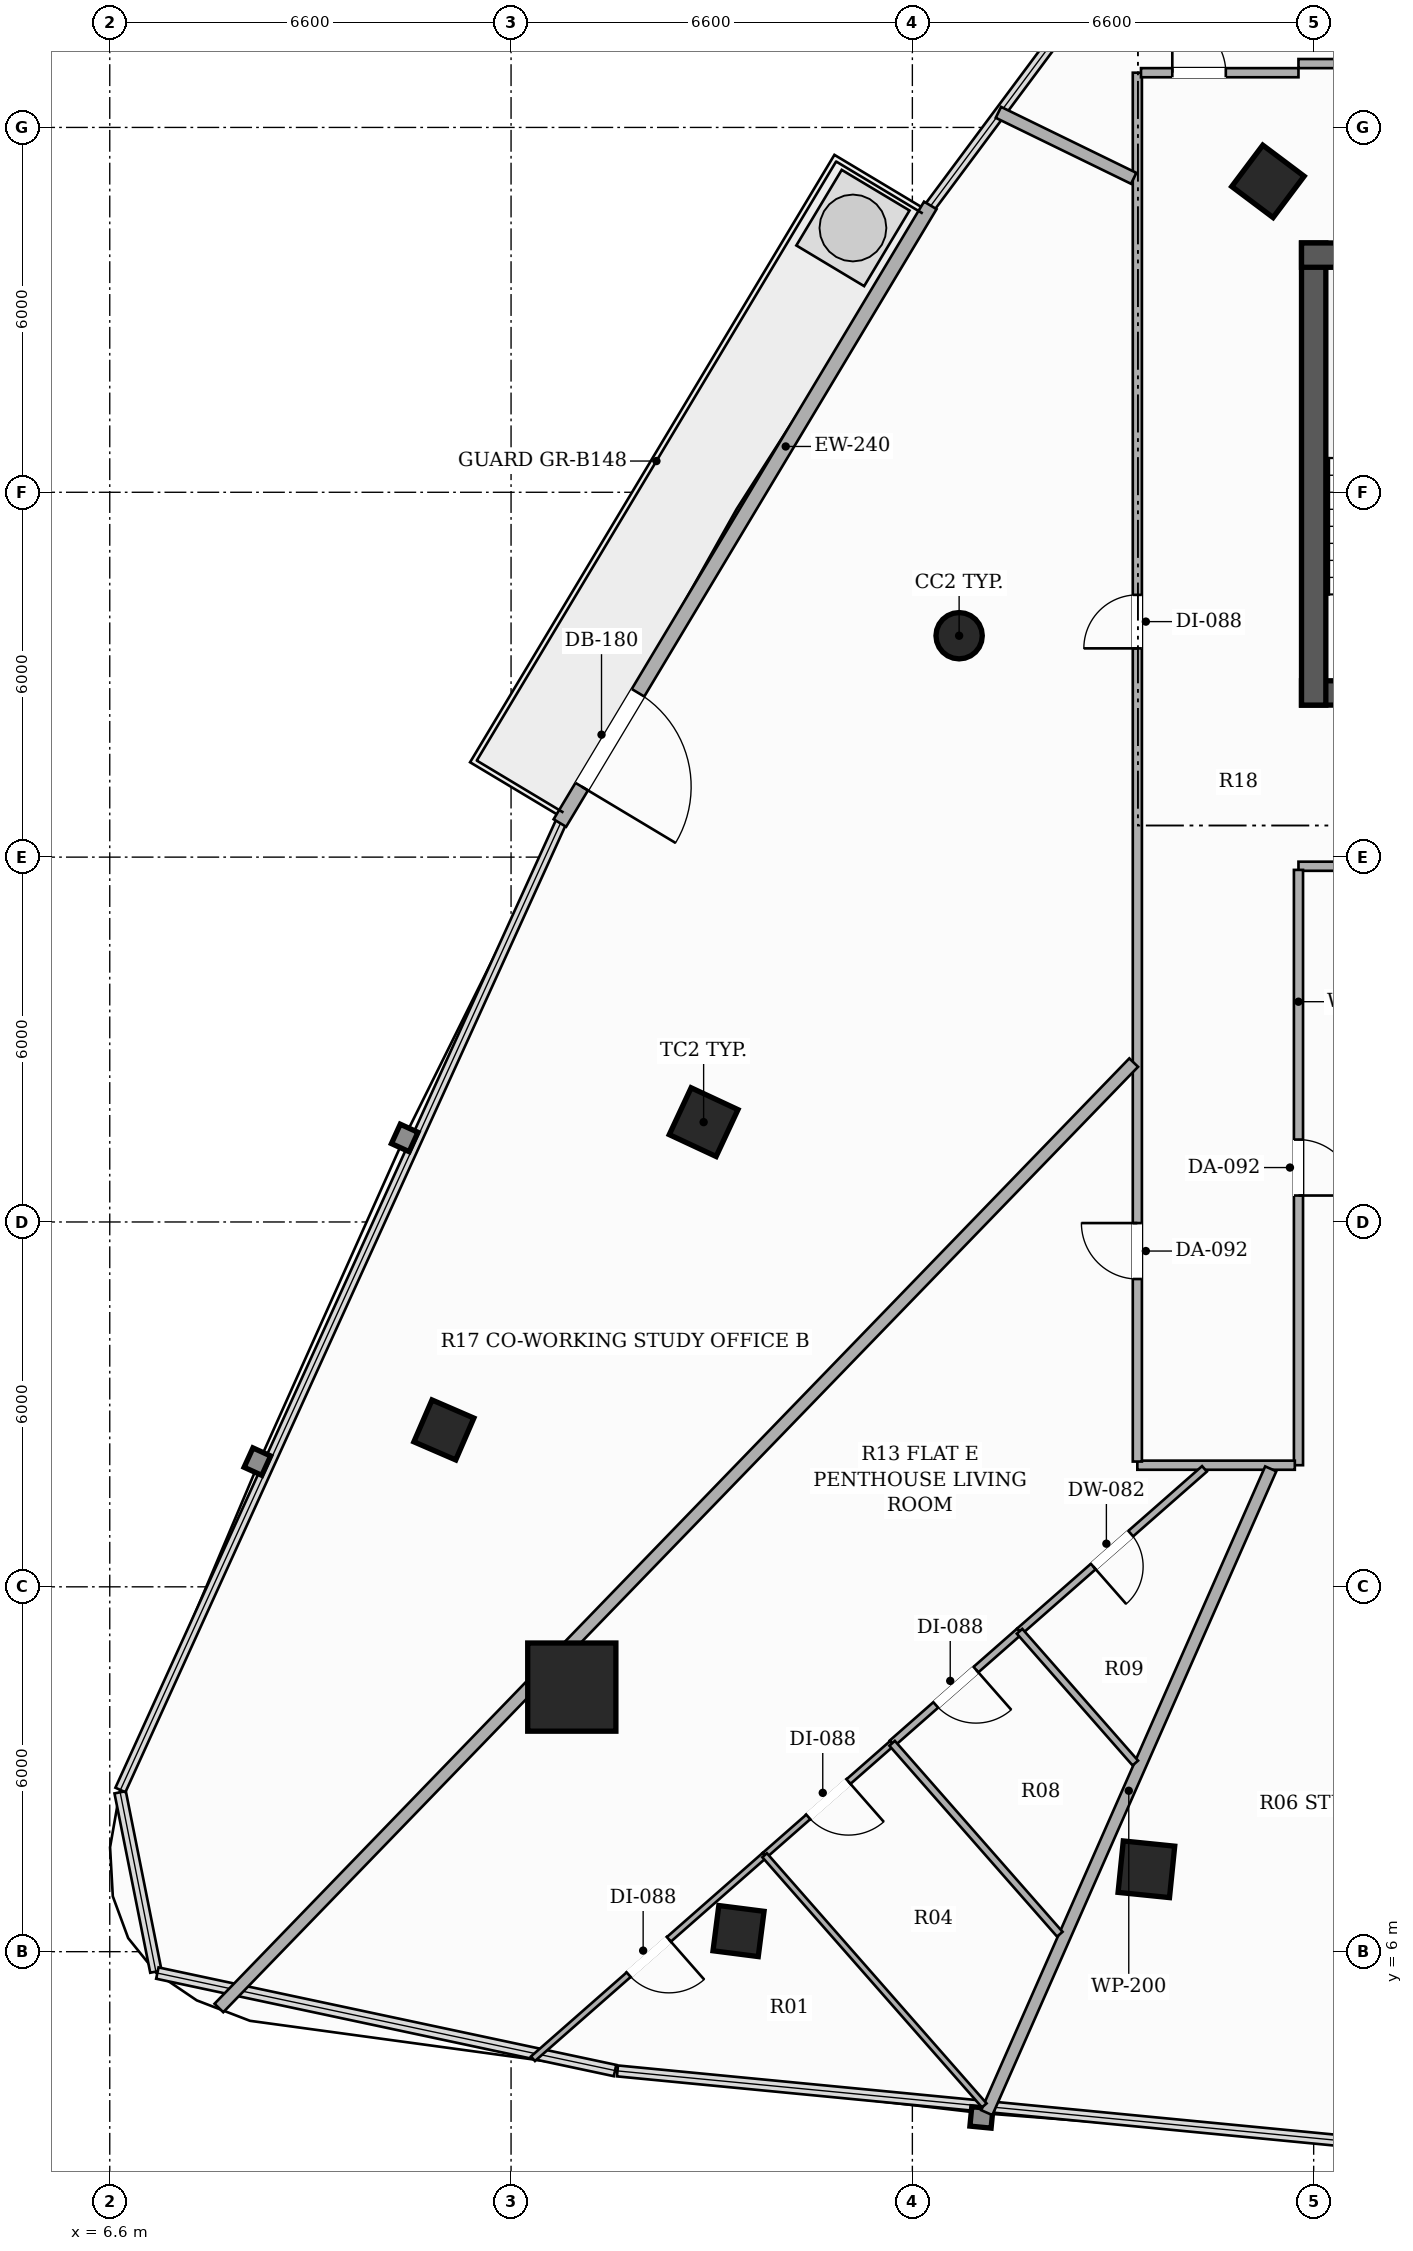
"""IFC4 building model, lengths in metres.
Left out: names, types, materials, properties, quantities, classifications, styles, units other than length and angle.
Written with IfcOpenShell. Run it as: python <this file> out.ifc"""

import sys

from ifc_helpers import new_model, si_unit, direction, frame, frame_2d, origin, origin_2d, place, context, subcontext, project, spatial, rectangle, hollow_rectangle, hollow_circle, extrude, element, fill, save


model = new_model("IFC4")
c1 = context("Model", 3, precision=1e-05, world=origin(), true_north=direction((0.0, 1.0)))
c2 = subcontext(c1, "Body", "Model", "MODEL_VIEW")
j1 = project(units=[si_unit("LENGTHUNIT", "METRE"), si_unit("PLANEANGLEUNIT", "RADIAN")], contexts=[c1])
p1 = place(None, origin())
s1 = spatial("IfcSite", under=j1, at=p1, CompositionType="ELEMENT")
p2 = place(p1, origin())
s2 = spatial("IfcBuilding", under=s1, at=p2, CompositionType="ELEMENT")
p3 = place(p2, frame((0.0, 0.0, 110.0)))
s3 = spatial("IfcBuildingStorey", under=s2, at=p3, CompositionType="ELEMENT", Elevation=110.0)
p4 = place(p3, frame((26.2, 26.7, 0.0), z_axis=(0.0, 0.0, 1.0), x_axis=(1.0, 0.0, 0.0)))
e1 = element("IfcWall", 1, at=p4, inside=s3, PredefinedType="SHEAR", context=c2, shape_type="SweptSolid", body=[
    extrude(rectangle(XDim=13.6, YDim=0.4, at=frame_2d((6.8, 0.0))), origin(), (0.0, 0.0, 1.0), 3.3),
])
p5 = place(p4, frame((4.35, 0.0, 0.0)))
e2 = element("IfcOpeningElement", 2, at=p5, cuts=e1, PredefinedType="OPENING", context=c2, shape_type="SweptSolid", body=[
    extrude(rectangle(XDim=1.05, YDim=2.15, at=frame_2d((0.525, 1.075))), frame((0.0, 0.21, 0.0), z_axis=(0.0, -1.0, 0.0), x_axis=(1.0, 0.0, 0.0)), (0.0, 0.0, 1.0), 0.42),
])
p6 = place(p4, frame((8.3, 0.0, 0.0)))
e3 = element("IfcOpeningElement", 3, at=p6, cuts=e1, PredefinedType="OPENING", context=c2, shape_type="SweptSolid", body=[
    extrude(rectangle(XDim=1.05, YDim=2.15, at=frame_2d((0.525, 1.075))), frame((0.0, 0.21, 0.0), z_axis=(0.0, -1.0, 0.0), x_axis=(1.0, 0.0, 0.0)), (0.0, 0.0, 1.0), 0.42),
])
p7 = place(p3, frame((26.4, 26.5, 0.0), z_axis=(0.0, 0.0, 1.0), x_axis=(0.0, 1.0, 0.0)))
e4 = element("IfcWall", 4, at=p7, inside=s3, PredefinedType="SHEAR", context=c2, shape_type="SweptSolid", body=[
    extrude(rectangle(XDim=7.6, YDim=0.4, at=frame_2d((3.8, 0.0))), origin(), (0.0, 0.0, 1.0), 3.3),
])
p8 = place(p3, frame((26.2, 33.9, 0.0), z_axis=(0.0, 0.0, 1.0), x_axis=(1.0, 0.0, 0.0)))
e5 = element("IfcWall", 5, at=p8, inside=s3, PredefinedType="SHEAR", context=c2, shape_type="SweptSolid", body=[
    extrude(rectangle(XDim=3.68, YDim=0.4, at=frame_2d((1.84, 0.0))), origin(), (0.0, 0.0, 1.0), 3.3),
])
p9 = place(p3, frame((14.199, 10.351, 0.0), z_axis=(0.0, 0.0, 1.0), x_axis=(1.0, 0.0, 0.0)))
e6 = element("IfcColumn", 6, at=p9, inside=s3, PredefinedType="COLUMN", context=c2, shape_type="SweptSolid", body=[
    extrude(hollow_rectangle(XDim=1.45, YDim=1.45, WallThickness=0.045, at=origin_2d()), origin(), (0.0, 0.0, 1.0), 3.3),
])
p10 = place(p3, frame((25.648, 35.113, 0.0), z_axis=(0.0, 0.0, 1.0), x_axis=(0.600420225326, 0.799684658487, 0.0)))
e7 = element("IfcColumn", 7, at=p10, inside=s3, PredefinedType="COLUMN", context=c2, shape_type="SweptSolid", body=[
    extrude(hollow_rectangle(XDim=0.85, YDim=0.85, WallThickness=0.028, at=origin_2d()), origin(), (0.0, 0.0, 1.0), 3.3),
])
p11 = place(p3, frame((20.569, 27.641, 0.0), z_axis=(0.0, 0.0, 1.0), x_axis=(1.0, 0.0, 0.0)))
e8 = element("IfcColumn", 8, at=p11, inside=s3, PredefinedType="COLUMN", context=c2, shape_type="SweptSolid", body=[
    extrude(hollow_circle(Radius=0.381, WallThickness=0.022, at=origin_2d()), origin(), (0.0, 0.0, 1.0), 3.3),
])
for number, where, z_axis, x_axis in (
    (9, (16.367, 19.642, 0.0), (0.0, 0.0, 1.0), (0.423, 0.906, 0.0)),
    (10, (23.649, 7.355, 0.0), (0.0, 0.0, 1.0), (-0.995, 0.101, 0.0)),
):
    element("IfcColumn", number, at=place(p3, frame(where, z_axis=z_axis, x_axis=x_axis)), inside=s3, PredefinedType="COLUMN", context=c2, shape_type="SweptSolid", body=[
        extrude(hollow_rectangle(XDim=0.85, YDim=0.85, WallThickness=0.028, at=origin_2d()), origin(), (0.0, 0.0, 1.0), 3.3),
    ])
for number, where, z_axis, x_axis in (
    (11, (12.095, 14.58, 0.0), (0.0, 0.0, 1.0), (0.397, 0.918, 0.0)),
    (12, (16.941, 6.339, 0.0), (0.0, 0.0, 1.0), (-0.992, 0.127, 0.0)),
):
    element("IfcColumn", number, at=place(p3, frame(where, z_axis=z_axis, x_axis=x_axis)), inside=s3, PredefinedType="COLUMN", context=c2, shape_type="SweptSolid", body=[
        extrude(hollow_rectangle(XDim=0.75, YDim=0.75, WallThickness=0.025, at=origin_2d()), origin(), (0.0, 0.0, 1.0), 3.3),
    ])
p12 = place(p3, frame((20.095, 34.718, 0.0), z_axis=(0.0, 0.0, 1.0), x_axis=(-0.514362369366, -0.857572943242, 0.0)))
e13 = element("IfcWall", 13, at=p12, inside=s3, PredefinedType="SOLIDWALL", context=c2, shape_type="SweptSolid", body=[
    extrude(rectangle(XDim=11.844, YDim=0.24, at=frame_2d((5.922, 0.0))), origin(), (0.0, 0.0, 1.0), 2.624),
])
p13 = place(p12, frame((9.346, 0.0, 0.0)))
e14 = element("IfcOpeningElement", 14, at=p13, cuts=e13, PredefinedType="OPENING", context=c2, shape_type="SweptSolid", body=[
    extrude(rectangle(XDim=1.8, YDim=2.2, at=frame_2d((0.9, 1.1))), frame((0.0, 0.13, 0.0), z_axis=(0.0, -1.0, 0.0), x_axis=(1.0, 0.0, 0.0)), (0.0, 0.0, 1.0), 0.26),
])
p14 = place(p3, frame((31.775, 23.85, 0.0), z_axis=(0.0, 0.0, 1.0), x_axis=(-1.0, 0.0, 0.0)))
e15 = element("IfcWall", 15, at=p14, inside=s3, PredefinedType="PARTITIONING", context=c2, shape_type="SweptSolid", body=[
    extrude(rectangle(XDim=5.625, YDim=0.15, at=frame_2d((2.812, 0.0))), origin(), (0.0, 0.0, 1.0), 2.721),
])
p15 = place(p3, frame((26.15, 23.79, 0.0), z_axis=(0.0, 0.0, 1.0), x_axis=(0.0, -1.0, 0.0)))
e16 = element("IfcWall", 16, at=p15, inside=s3, PredefinedType="PARTITIONING", context=c2, shape_type="SweptSolid", body=[
    extrude(rectangle(XDim=9.79, YDim=0.15, at=frame_2d((4.895, 0.0))), origin(), (0.0, 0.0, 1.0), 2.721),
])
p16 = place(p15, frame((4.435, 0.0, 0.0)))
e17 = element("IfcOpeningElement", 17, at=p16, cuts=e16, PredefinedType="OPENING", context=c2, shape_type="SweptSolid", body=[
    extrude(rectangle(XDim=0.92, YDim=2.15, at=frame_2d((0.46, 1.075))), frame((0.0, 0.085, 0.0), z_axis=(0.0, -1.0, 0.0), x_axis=(1.0, 0.0, 0.0)), (0.0, 0.0, 1.0), 0.17),
])
p17 = place(p3, frame((26.09, 14.0, 0.0), z_axis=(0.0, 0.0, 1.0), x_axis=(-1.0, 0.0, 0.0)))
e18 = element("IfcWall", 18, at=p17, inside=s3, PredefinedType="PARTITIONING", context=c2, shape_type="SweptSolid", body=[
    extrude(rectangle(XDim=2.59, YDim=0.15, at=frame_2d((1.295, 0.0))), origin(), (0.0, 0.0, 1.0), 2.721),
])
p18 = place(p3, frame((23.5, 14.06, 0.0), z_axis=(0.0, 0.0, 1.0), x_axis=(0.0, 1.0, 0.0)))
e19 = element("IfcWall", 19, at=p18, inside=s3, PredefinedType="PARTITIONING", context=c2, shape_type="SweptSolid", body=[
    extrude(rectangle(XDim=22.84, YDim=0.15, at=frame_2d((11.42, 0.0))), origin(), (0.0, 0.0, 1.0), 2.413),
])
p19 = place(p18, frame((13.373, 0.0, 0.0)))
e20 = element("IfcOpeningElement", 20, at=p19, cuts=e19, PredefinedType="OPENING", context=c2, shape_type="SweptSolid", body=[
    extrude(rectangle(XDim=0.88, YDim=2.1, at=frame_2d((0.44, 1.05))), frame((0.0, 0.085, 0.0), z_axis=(0.0, -1.0, 0.0), x_axis=(1.0, 0.0, 0.0)), (0.0, 0.0, 1.0), 0.17),
])
p20 = place(p18, frame((3.002, 0.0, 0.0)))
e21 = element("IfcOpeningElement", 21, at=p20, cuts=e19, PredefinedType="OPENING", context=c2, shape_type="SweptSolid", body=[
    extrude(rectangle(XDim=0.92, YDim=2.15, at=frame_2d((0.46, 1.075))), frame((0.0, 0.085, 0.0), z_axis=(0.0, -1.0, 0.0), x_axis=(1.0, 0.0, 0.0)), (0.0, 0.0, 1.0), 0.17),
])
p21 = place(p3, frame((23.56, 36.9, 0.0), z_axis=(0.0, 0.0, 1.0), x_axis=(1.0, 0.0, 0.0)))
e22 = element("IfcWall", 22, at=p21, inside=s3, PredefinedType="PARTITIONING", context=c2, shape_type="SweptSolid", body=[
    extrude(rectangle(XDim=2.59, YDim=0.15, at=frame_2d((1.295, 0.0))), origin(), (0.0, 0.0, 1.0), 2.413),
])
p22 = place(p21, frame((0.515, 0.0, 0.0)))
e23 = element("IfcOpeningElement", 23, at=p22, cuts=e22, PredefinedType="OPENING", context=c2, shape_type="SweptSolid", body=[
    extrude(rectangle(XDim=0.88, YDim=2.1, at=frame_2d((0.44, 1.05))), frame((0.0, 0.085, 0.0), z_axis=(0.0, -1.0, 0.0), x_axis=(1.0, 0.0, 0.0)), (0.0, 0.0, 1.0), 0.17),
])
p23 = place(p3, frame((26.15, 37.05, 0.0), z_axis=(0.0, 0.0, 1.0), x_axis=(1.0, 0.0, 0.0)))
e24 = element("IfcWall", 24, at=p23, inside=s3, PredefinedType="PARTITIONING", context=c2, shape_type="SweptSolid", body=[
    extrude(rectangle(XDim=2.0, YDim=0.15, at=frame_2d((1.0, 0.0))), origin(), (0.0, 0.0, 1.0), 2.413),
])
p24 = place(p3, frame((21.024, 3.353, 0.0), z_axis=(0.0, 0.0, 1.0), x_axis=(0.403601766718, 0.914934759369, 0.0)))
e25 = element("IfcWall", 25, at=p24, inside=s3, PredefinedType="PARTITIONING", context=c2, shape_type="SweptSolid", body=[
    extrude(rectangle(XDim=11.571, YDim=0.2, at=frame_2d((5.786, 0.0))), origin(), (0.0, 0.0, 1.0), 2.413),
])
p25 = place(p3, frame((23.44, 20.621, 0.0), z_axis=(0.0, 0.0, 1.0), x_axis=(-0.695405261367, -0.718617786075, 0.0)))
e26 = element("IfcWall", 26, at=p25, inside=s3, PredefinedType="PARTITIONING", context=c2, shape_type="SweptSolid", body=[
    extrude(rectangle(XDim=21.635, YDim=0.2, at=frame_2d((10.817, 0.0))), origin(), (0.0, 0.0, 1.0), 2.413),
])
p26 = place(p3, frame((21.215, 36.248, 0.0), z_axis=(0.0, 0.0, 1.0), x_axis=(0.898821522371, -0.438314808012, 0.0)))
e27 = element("IfcWall", 27, at=p26, inside=s3, PredefinedType="PARTITIONING", context=c2, shape_type="SweptSolid", body=[
    extrude(rectangle(XDim=2.475, YDim=0.2, at=frame_2d((1.238, 0.0))), origin(), (0.0, 0.0, 1.0), 3.06),
])
p27 = place(p3, frame((24.604, 13.94, 0.0), z_axis=(0.0, 0.0, 1.0), x_axis=(-0.751349767919, -0.659904179595, 0.0)))
e28 = element("IfcWall", 28, at=p27, inside=s3, PredefinedType="PARTITIONING", context=c2, shape_type="SweptSolid", body=[
    extrude(rectangle(XDim=4.047, YDim=0.12, at=frame_2d((2.024, 0.0))), origin(), (0.0, 0.0, 1.0), 2.721),
])
p28 = place(p27, frame((1.614, 0.0, 0.0)))
e29 = element("IfcOpeningElement", 29, at=p28, cuts=e28, PredefinedType="OPENING", context=c2, shape_type="SweptSolid", body=[
    extrude(rectangle(XDim=0.82, YDim=2.1, at=frame_2d((0.41, 1.05))), frame((0.0, 0.07, 0.0), z_axis=(0.0, -1.0, 0.0), x_axis=(1.0, 0.0, 0.0)), (0.0, 0.0, 1.0), 0.14),
])
p29 = place(p3, frame((21.563, 11.269, 0.0), z_axis=(0.0, 0.0, 1.0), x_axis=(-0.751138604229, -0.660144527537, 0.0)))
e30 = element("IfcWall", 30, at=p29, inside=s3, PredefinedType="PARTITIONING", context=c2, shape_type="SweptSolid", body=[
    extrude(rectangle(XDim=2.79, YDim=0.12, at=frame_2d((1.395, 0.0))), origin(), (0.0, 0.0, 1.0), 2.721),
])
p30 = place(p29, frame((0.955, 0.0, 0.0)))
e31 = element("IfcOpeningElement", 31, at=p30, cuts=e30, PredefinedType="OPENING", context=c2, shape_type="SweptSolid", body=[
    extrude(rectangle(XDim=0.88, YDim=2.1, at=frame_2d((0.44, 1.05))), frame((0.0, 0.07, 0.0), z_axis=(0.0, -1.0, 0.0), x_axis=(1.0, 0.0, 0.0)), (0.0, 0.0, 1.0), 0.14),
])
p31 = place(p3, frame((17.37, 7.586, 0.0), z_axis=(0.0, 0.0, 1.0), x_axis=(-0.751292920188, -0.659968899324, 0.0)))
e32 = element("IfcWall", 32, at=p31, inside=s3, PredefinedType="PARTITIONING", context=c2, shape_type="SweptSolid", body=[
    extrude(rectangle(XDim=5.071, YDim=0.1, at=frame_2d((2.536, 0.0))), origin(), (0.0, 0.0, 1.0), 2.413),
])
p32 = place(p31, frame((2.096, 0.0, 0.0)))
e33 = element("IfcOpeningElement", 33, at=p32, cuts=e32, PredefinedType="OPENING", context=c2, shape_type="SweptSolid", body=[
    extrude(rectangle(XDim=0.88, YDim=2.1, at=frame_2d((0.44, 1.05))), frame((0.0, 0.06, 0.0), z_axis=(0.0, -1.0, 0.0), x_axis=(1.0, 0.0, 0.0)), (0.0, 0.0, 1.0), 0.12),
])
p33 = place(p3, frame((19.467, 9.427, 0.0), z_axis=(0.0, 0.0, 1.0), x_axis=(-0.751464558758, -0.659773458795, 0.0)))
e34 = element("IfcWall", 34, at=p33, inside=s3, PredefinedType="PARTITIONING", context=c2, shape_type="SweptSolid", body=[
    extrude(rectangle(XDim=2.791, YDim=0.1, at=frame_2d((1.395, 0.0))), origin(), (0.0, 0.0, 1.0), 2.721),
])
p34 = place(p33, frame((0.955, 0.0, 0.0)))
e35 = element("IfcOpeningElement", 35, at=p34, cuts=e34, PredefinedType="OPENING", context=c2, shape_type="SweptSolid", body=[
    extrude(rectangle(XDim=0.88, YDim=2.1, at=frame_2d((0.44, 1.05))), frame((0.0, 0.06, 0.0), z_axis=(0.0, -1.0, 0.0), x_axis=(1.0, 0.0, 0.0)), (0.0, 0.0, 1.0), 0.12),
])
p35 = place(p3, frame((23.467, 9.102, 0.0), z_axis=(0.0, 0.0, 1.0), x_axis=(-0.660061062947, 0.751211949573, 0.0)))
e36 = element("IfcWall", 36, at=p35, inside=s3, PredefinedType="PARTITIONING", context=c2, shape_type="SweptSolid", body=[
    extrude(rectangle(XDim=2.885, YDim=0.12, at=frame_2d((1.442, 0.0))), origin(), (0.0, 0.0, 1.0), 2.721),
])
p36 = place(p3, frame((22.225, 6.287, 0.0), z_axis=(0.0, 0.0, 1.0), x_axis=(-0.659946783628, 0.751312347016, 0.0)))
e37 = element("IfcWall", 37, at=p36, inside=s3, PredefinedType="PARTITIONING", context=c2, shape_type="SweptSolid", body=[
    extrude(rectangle(XDim=4.179, YDim=0.12, at=frame_2d((2.09, 0.0))), origin(), (0.0, 0.0, 1.0), 2.413),
])
p37 = place(p3, frame((17.37, 7.586, 0.0), z_axis=(0.0, 0.0, 1.0), x_axis=(0.659851528992, -0.751396007234, 0.0)))
e38 = element("IfcWall", 38, at=p37, inside=s3, PredefinedType="PARTITIONING", context=c2, shape_type="SweptSolid", body=[
    extrude(rectangle(XDim=5.475, YDim=0.1, at=frame_2d((2.738, 0.0))), origin(), (0.0, 0.0, 1.0), 2.413),
])
p38 = place(p13, origin())
e39 = element("IfcDoor", 39, at=p38, inside=s3, OperationType="SINGLE_SWING_RIGHT", PredefinedType="DOOR", context=c2, shape_type="SweptSolid", body=[
    extrude(rectangle(XDim=1.8, YDim=2.2, at=frame_2d((0.9, 1.1))), frame((0.0, 0.025, 0.0), z_axis=(0.0, -1.0, 0.0), x_axis=(1.0, 0.0, 0.0)), (0.0, 0.0, 1.0), 0.05),
])
fill(e14, e39)
p39 = place(p16, origin())
e40 = element("IfcDoor", 40, at=p39, inside=s3, OperationType="SINGLE_SWING_RIGHT", PredefinedType="DOOR", context=c2, shape_type="SweptSolid", body=[
    extrude(rectangle(XDim=0.92, YDim=2.15, at=frame_2d((0.46, 1.075))), frame((0.0, 0.025, 0.0), z_axis=(0.0, -1.0, 0.0), x_axis=(1.0, 0.0, 0.0)), (0.0, 0.0, 1.0), 0.05),
])
fill(e17, e40)
p40 = place(p19, origin())
e41 = element("IfcDoor", 41, at=p40, inside=s3, OperationType="SINGLE_SWING_LEFT", PredefinedType="DOOR", context=c2, shape_type="SweptSolid", body=[
    extrude(rectangle(XDim=0.88, YDim=2.1, at=frame_2d((0.44, 1.05))), frame((0.0, 0.025, 0.0), z_axis=(0.0, -1.0, 0.0), x_axis=(1.0, 0.0, 0.0)), (0.0, 0.0, 1.0), 0.05),
])
fill(e20, e41)
p41 = place(p20, origin())
e42 = element("IfcDoor", 42, at=p41, inside=s3, OperationType="SINGLE_SWING_RIGHT", PredefinedType="DOOR", context=c2, shape_type="SweptSolid", body=[
    extrude(rectangle(XDim=0.92, YDim=2.15, at=frame_2d((0.46, 1.075))), frame((0.0, 0.025, 0.0), z_axis=(0.0, -1.0, 0.0), x_axis=(1.0, 0.0, 0.0)), (0.0, 0.0, 1.0), 0.05),
])
fill(e21, e42)
p42 = place(p28, origin())
e43 = element("IfcDoor", 43, at=p42, inside=s3, OperationType="SINGLE_SWING_RIGHT", PredefinedType="DOOR", context=c2, shape_type="SweptSolid", body=[
    extrude(rectangle(XDim=0.82, YDim=2.1, at=frame_2d((0.41, 1.05))), frame((0.0, 0.025, 0.0), z_axis=(0.0, -1.0, 0.0), x_axis=(1.0, 0.0, 0.0)), (0.0, 0.0, 1.0), 0.05),
])
fill(e29, e43)
p43 = place(p30, origin())
e44 = element("IfcDoor", 44, at=p43, inside=s3, OperationType="SINGLE_SWING_LEFT", PredefinedType="DOOR", context=c2, shape_type="SweptSolid", body=[
    extrude(rectangle(XDim=0.88, YDim=2.1, at=frame_2d((0.44, 1.05))), frame((0.0, 0.025, 0.0), z_axis=(0.0, -1.0, 0.0), x_axis=(1.0, 0.0, 0.0)), (0.0, 0.0, 1.0), 0.05),
])
fill(e31, e44)
p44 = place(p32, origin())
e45 = element("IfcDoor", 45, at=p44, inside=s3, OperationType="SINGLE_SWING_LEFT", PredefinedType="DOOR", context=c2, shape_type="SweptSolid", body=[
    extrude(rectangle(XDim=0.88, YDim=2.1, at=frame_2d((0.44, 1.05))), frame((0.0, 0.025, 0.0), z_axis=(0.0, -1.0, 0.0), x_axis=(1.0, 0.0, 0.0)), (0.0, 0.0, 1.0), 0.05),
])
fill(e33, e45)
p45 = place(p34, origin())
e46 = element("IfcDoor", 46, at=p45, inside=s3, OperationType="SINGLE_SWING_LEFT", PredefinedType="DOOR", context=c2, shape_type="SweptSolid", body=[
    extrude(rectangle(XDim=0.88, YDim=2.1, at=frame_2d((0.44, 1.05))), frame((0.0, 0.025, 0.0), z_axis=(0.0, -1.0, 0.0), x_axis=(1.0, 0.0, 0.0)), (0.0, 0.0, 1.0), 0.05),
])
fill(e35, e46)
p46 = place(p22, origin())
e47 = element("IfcDoor", 47, at=p46, inside=s3, OperationType="SINGLE_SWING_LEFT", PredefinedType="DOOR", context=c2, shape_type="SweptSolid", body=[
    extrude(rectangle(XDim=0.88, YDim=2.1, at=frame_2d((0.44, 1.05))), frame((0.0, 0.025, 0.0), z_axis=(0.0, -1.0, 0.0), x_axis=(1.0, 0.0, 0.0)), (0.0, 0.0, 1.0), 0.05),
])
fill(e23, e47)
save(model, sys.argv[1])
